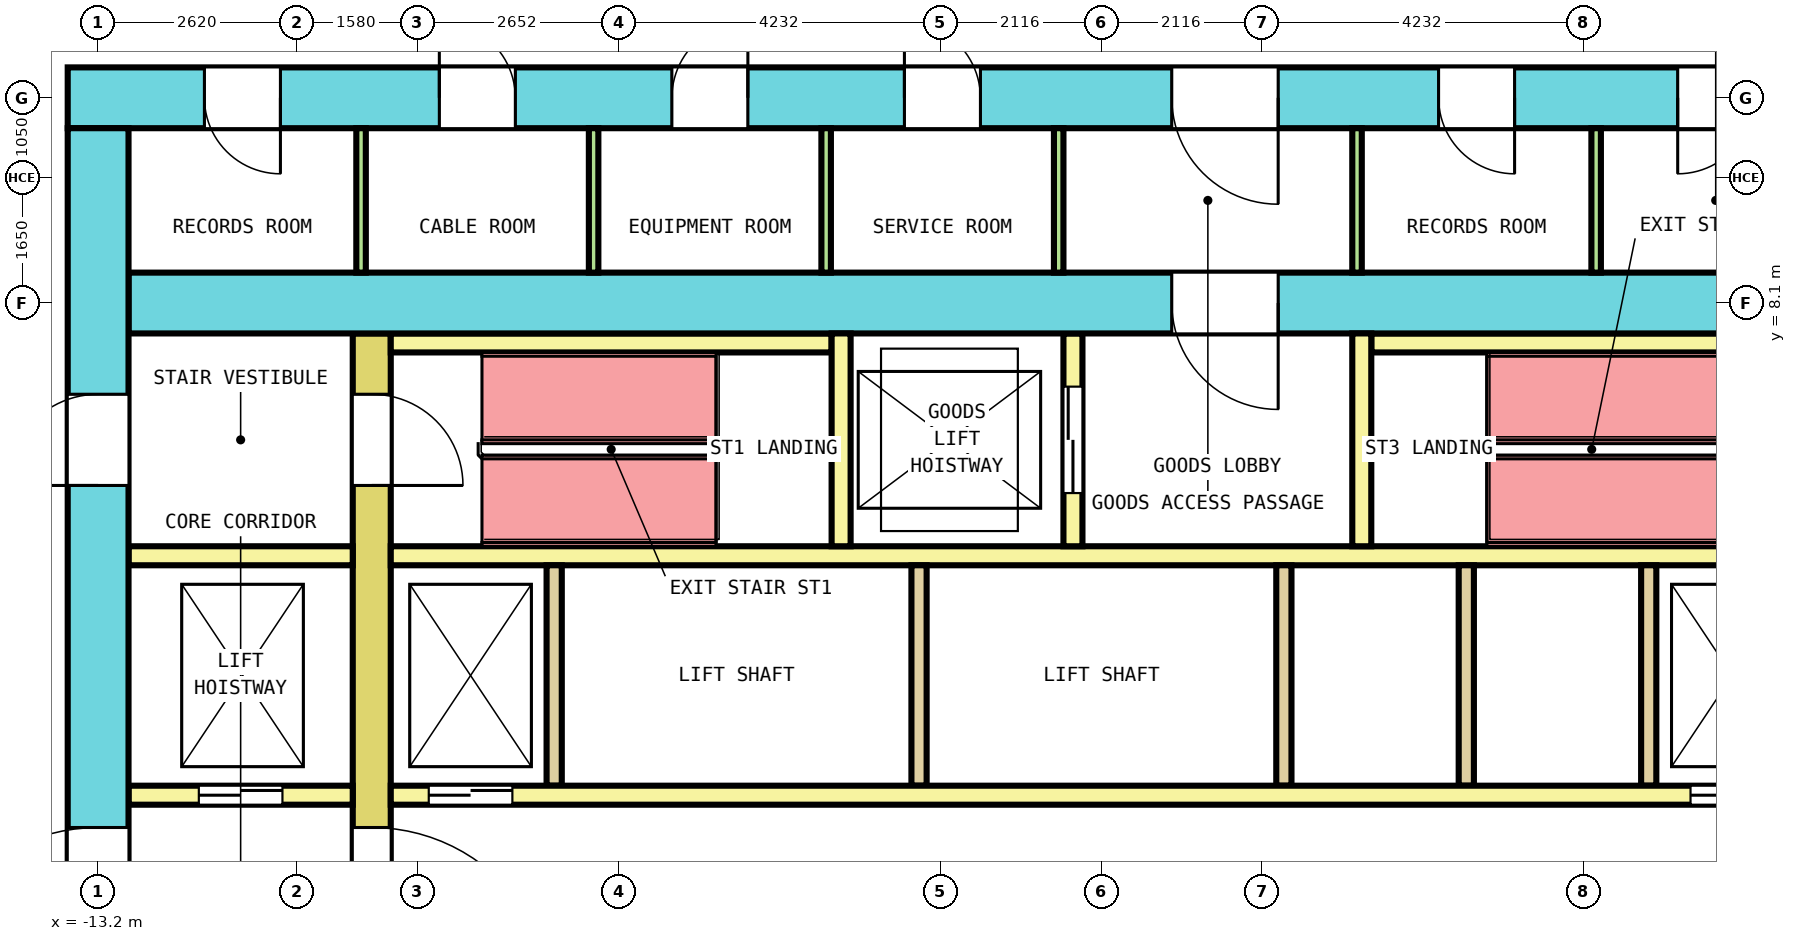
"""IFC4 building model, lengths in metres.
Left out: names, types, materials, properties, quantities, classifications, styles, units other than length and angle.
Written with IfcOpenShell. Run it as: python <this file> out.ifc"""

import sys

from ifc_helpers import new_model, si_unit, direction, frame, frame_2d, origin, place, context, subcontext, project, spatial, rectangle, extrude, element, fill, save


model = new_model("IFC4")
c1 = context("Model", 3, precision=1e-05, world=origin(), true_north=direction((0.0, 1.0)))
c2 = subcontext(c1, "Body", "Model", "MODEL_VIEW")
j1 = project(units=[si_unit("LENGTHUNIT", "METRE"), si_unit("PLANEANGLEUNIT", "RADIAN")], contexts=[c1])
p1 = place(None, origin())
s1 = spatial("IfcSite", under=j1, at=p1, CompositionType="ELEMENT")
p2 = place(p1, origin())
s2 = spatial("IfcBuilding", under=s1, at=p2, CompositionType="ELEMENT")
p3 = place(p2, frame((0.0, 0.0, 102.8)))
s3 = spatial("IfcBuildingStorey", under=s2, at=p3, CompositionType="ELEMENT", Elevation=102.8)
p4 = place(p3, frame((-13.6, 10.8, 0.0), z_axis=(0.0, 0.0, 1.0), x_axis=(1.0, 0.0, 0.0)))
e1 = element("IfcWall", 1, at=p4, inside=s3, PredefinedType="SHEAR", context=c2, shape_type="SweptSolid", body=[
    extrude(rectangle(XDim=27.2, YDim=0.8, at=frame_2d((13.6, 0.0))), origin(), (0.0, 0.0, 1.0), 4.1),
])
p5 = place(p4, frame((1.798, 0.0, 0.0)))
e2 = element("IfcOpeningElement", 2, at=p5, cuts=e1, PredefinedType="OPENING", context=c2, shape_type="SweptSolid", body=[
    extrude(rectangle(XDim=1.0, YDim=2.1, at=frame_2d((0.5, 1.05))), frame((0.0, 0.41, 0.0), z_axis=(0.0, -1.0, 0.0), x_axis=(1.0, 0.0, 0.0)), (0.0, 0.0, 1.0), 0.82),
])
p6 = place(p4, frame((4.889, 0.0, 0.0)))
e3 = element("IfcOpeningElement", 3, at=p6, cuts=e1, PredefinedType="OPENING", context=c2, shape_type="SweptSolid", body=[
    extrude(rectangle(XDim=1.0, YDim=2.1, at=frame_2d((0.5, 1.05))), frame((0.0, 0.41, 0.0), z_axis=(0.0, -1.0, 0.0), x_axis=(1.0, 0.0, 0.0)), (0.0, 0.0, 1.0), 0.82),
])
p7 = place(p4, frame((7.948, 0.0, 0.0)))
e4 = element("IfcOpeningElement", 4, at=p7, cuts=e1, PredefinedType="OPENING", context=c2, shape_type="SweptSolid", body=[
    extrude(rectangle(XDim=1.0, YDim=2.1, at=frame_2d((0.5, 1.05))), frame((0.0, 0.41, 0.0), z_axis=(0.0, -1.0, 0.0), x_axis=(1.0, 0.0, 0.0)), (0.0, 0.0, 1.0), 0.82),
])
p8 = place(p4, frame((11.008, 0.0, 0.0)))
e5 = element("IfcOpeningElement", 5, at=p8, cuts=e1, PredefinedType="OPENING", context=c2, shape_type="SweptSolid", body=[
    extrude(rectangle(XDim=1.0, YDim=2.1, at=frame_2d((0.5, 1.05))), frame((0.0, 0.41, 0.0), z_axis=(0.0, -1.0, 0.0), x_axis=(1.0, 0.0, 0.0)), (0.0, 0.0, 1.0), 0.82),
])
p9 = place(p4, frame((18.035, 0.0, 0.0)))
e6 = element("IfcOpeningElement", 6, at=p9, cuts=e1, PredefinedType="OPENING", context=c2, shape_type="SweptSolid", body=[
    extrude(rectangle(XDim=1.0, YDim=2.1, at=frame_2d((0.5, 1.05))), frame((0.0, 0.41, 0.0), z_axis=(0.0, -1.0, 0.0), x_axis=(1.0, 0.0, 0.0)), (0.0, 0.0, 1.0), 0.82),
])
p10 = place(p4, frame((21.181, 0.0, 0.0)))
e7 = element("IfcOpeningElement", 7, at=p10, cuts=e1, PredefinedType="OPENING", context=c2, shape_type="SweptSolid", body=[
    extrude(rectangle(XDim=1.0, YDim=2.1, at=frame_2d((0.5, 1.05))), frame((0.0, 0.41, 0.0), z_axis=(0.0, -1.0, 0.0), x_axis=(1.0, 0.0, 0.0)), (0.0, 0.0, 1.0), 0.82),
])
p11 = place(p4, frame((24.358, 0.0, 0.0)))
e8 = element("IfcOpeningElement", 8, at=p11, cuts=e1, PredefinedType="OPENING", context=c2, shape_type="SweptSolid", body=[
    extrude(rectangle(XDim=1.0, YDim=2.1, at=frame_2d((0.5, 1.05))), frame((0.0, 0.41, 0.0), z_axis=(0.0, -1.0, 0.0), x_axis=(1.0, 0.0, 0.0)), (0.0, 0.0, 1.0), 0.82),
])
p12 = place(p4, frame((14.525, 0.0, 0.0)))
e9 = element("IfcOpeningElement", 9, at=p12, cuts=e1, PredefinedType="OPENING", context=c2, shape_type="SweptSolid", body=[
    extrude(rectangle(XDim=1.4, YDim=2.1, at=frame_2d((0.7, 1.05))), frame((0.0, 0.41, 0.0), z_axis=(0.0, -1.0, 0.0), x_axis=(1.0, 0.0, 0.0)), (0.0, 0.0, 1.0), 0.82),
])
p13 = place(p3, frame((-13.2, -10.4, 0.0), z_axis=(0.0, 0.0, 1.0), x_axis=(0.0, 1.0, 0.0)))
e10 = element("IfcWall", 10, at=p13, inside=s3, PredefinedType="SHEAR", context=c2, shape_type="SweptSolid", body=[
    extrude(rectangle(XDim=20.8, YDim=0.8, at=frame_2d((10.4, 0.0))), origin(), (0.0, 0.0, 1.0), 4.1),
])
p14 = place(p13, frame((9.2, 0.0, 0.0)))
e11 = element("IfcOpeningElement", 11, at=p14, cuts=e10, PredefinedType="OPENING", context=c2, shape_type="SweptSolid", body=[
    extrude(rectangle(XDim=2.4, YDim=2.1, at=frame_2d((1.2, 1.05))), frame((0.0, 0.41, 0.0), z_axis=(0.0, -1.0, 0.0), x_axis=(1.0, 0.0, 0.0)), (0.0, 0.0, 1.0), 0.82),
])
p15 = place(p13, frame((16.1, 0.0, 0.0)))
e12 = element("IfcOpeningElement", 12, at=p15, cuts=e10, PredefinedType="OPENING", context=c2, shape_type="SweptSolid", body=[
    extrude(rectangle(XDim=1.2, YDim=2.1, at=frame_2d((0.6, 1.05))), frame((0.0, 0.41, 0.0), z_axis=(0.0, -1.0, 0.0), x_axis=(1.0, 0.0, 0.0)), (0.0, 0.0, 1.0), 0.82),
])
p16 = place(p13, frame((3.5, 0.0, 0.0)))
e13 = element("IfcOpeningElement", 13, at=p16, cuts=e10, PredefinedType="OPENING", context=c2, shape_type="SweptSolid", body=[
    extrude(rectangle(XDim=1.2, YDim=2.1, at=frame_2d((0.6, 1.05))), frame((0.0, 0.41, 0.0), z_axis=(0.0, -1.0, 0.0), x_axis=(1.0, 0.0, 0.0)), (0.0, 0.0, 1.0), 0.82),
])
p17 = place(p3, frame((-12.8, 8.1, 0.0), z_axis=(0.0, 0.0, 1.0), x_axis=(1.0, 0.0, 0.0)))
e14 = element("IfcWall", 14, at=p17, inside=s3, PredefinedType="SHEAR", context=c2, shape_type="SweptSolid", body=[
    extrude(rectangle(XDim=25.6, YDim=0.8, at=frame_2d((12.8, 0.0))), origin(), (0.0, 0.0, 1.0), 4.1),
])
p18 = place(p17, frame((13.725, 0.0, 0.0)))
e15 = element("IfcOpeningElement", 15, at=p18, cuts=e14, PredefinedType="OPENING", context=c2, shape_type="SweptSolid", body=[
    extrude(rectangle(XDim=1.4, YDim=2.1, at=frame_2d((0.7, 1.05))), frame((0.0, 0.41, 0.0), z_axis=(0.0, -1.0, 0.0), x_axis=(1.0, 0.0, 0.0)), (0.0, 0.0, 1.0), 0.82),
])
p19 = place(p3, frame((-9.6, -7.7, 0.0), z_axis=(0.0, 0.0, 1.0), x_axis=(0.0, 1.0, 0.0)))
e16 = element("IfcWall", 16, at=p19, inside=s3, PredefinedType="SHEAR", context=c2, shape_type="SweptSolid", body=[
    extrude(rectangle(XDim=15.4, YDim=0.5, at=frame_2d((7.7, 0.0))), origin(), (0.0, 0.0, 1.0), 4.1),
])
p20 = place(p19, frame((6.5, 0.0, 0.0)))
e17 = element("IfcOpeningElement", 17, at=p20, cuts=e16, PredefinedType="OPENING", context=c2, shape_type="SweptSolid", body=[
    extrude(rectangle(XDim=2.4, YDim=2.1, at=frame_2d((1.2, 1.05))), frame((0.0, 0.26, 0.0), z_axis=(0.0, -1.0, 0.0), x_axis=(1.0, 0.0, 0.0)), (0.0, 0.0, 1.0), 0.52),
])
p21 = place(p19, frame((13.4, 0.0, 0.0)))
e18 = element("IfcOpeningElement", 18, at=p21, cuts=e16, PredefinedType="OPENING", context=c2, shape_type="SweptSolid", body=[
    extrude(rectangle(XDim=1.2, YDim=2.1, at=frame_2d((0.6, 1.05))), frame((0.0, 0.26, 0.0), z_axis=(0.0, -1.0, 0.0), x_axis=(1.0, 0.0, 0.0)), (0.0, 0.0, 1.0), 0.52),
])
p22 = place(p19, frame((0.8, 0.0, 0.0)))
e19 = element("IfcOpeningElement", 19, at=p22, cuts=e16, PredefinedType="OPENING", context=c2, shape_type="SweptSolid", body=[
    extrude(rectangle(XDim=1.2, YDim=2.1, at=frame_2d((0.6, 1.05))), frame((0.0, 0.26, 0.0), z_axis=(0.0, -1.0, 0.0), x_axis=(1.0, 0.0, 0.0)), (0.0, 0.0, 1.0), 0.52),
])
p23 = place(p3, frame((-12.8, 1.625, 0.0), z_axis=(0.0, 0.0, 1.0), x_axis=(1.0, 0.0, 0.0)))
e20 = element("IfcWall", 20, at=p23, inside=s3, PredefinedType="SOLIDWALL", context=c2, shape_type="SweptSolid", body=[
    extrude(rectangle(XDim=2.95, YDim=0.25, at=frame_2d((1.475, 0.0))), origin(), (0.0, 0.0, 1.0), 4.1),
])
p24 = place(p23, frame((0.925, 0.0, 0.0)))
e21 = element("IfcOpeningElement", 21, at=p24, cuts=e20, PredefinedType="OPENING", context=c2, shape_type="SweptSolid", body=[
    extrude(rectangle(XDim=1.1, YDim=2.1, at=frame_2d((0.55, 1.05))), frame((0.0, 0.135, 0.0), z_axis=(0.0, -1.0, 0.0), x_axis=(1.0, 0.0, 0.0)), (0.0, 0.0, 1.0), 0.27),
])
p25 = place(p3, frame((-9.35, 1.625, 0.0), z_axis=(0.0, 0.0, 1.0), x_axis=(1.0, 0.0, 0.0)))
e22 = element("IfcWall", 22, at=p25, inside=s3, PredefinedType="SOLIDWALL", context=c2, shape_type="SweptSolid", body=[
    extrude(rectangle(XDim=18.7, YDim=0.25, at=frame_2d((9.35, 0.0))), origin(), (0.0, 0.0, 1.0), 4.1),
])
p26 = place(p25, frame((0.5, 0.0, 0.0)))
e23 = element("IfcOpeningElement", 23, at=p26, cuts=e22, PredefinedType="OPENING", context=c2, shape_type="SweptSolid", body=[
    extrude(rectangle(XDim=1.1, YDim=2.1, at=frame_2d((0.55, 1.05))), frame((0.0, 0.135, 0.0), z_axis=(0.0, -1.0, 0.0), x_axis=(1.0, 0.0, 0.0)), (0.0, 0.0, 1.0), 0.27),
])
p27 = place(p25, frame((17.1, 0.0, 0.0)))
e24 = element("IfcOpeningElement", 24, at=p27, cuts=e22, PredefinedType="OPENING", context=c2, shape_type="SweptSolid", body=[
    extrude(rectangle(XDim=1.1, YDim=2.1, at=frame_2d((0.55, 1.05))), frame((0.0, 0.135, 0.0), z_axis=(0.0, -1.0, 0.0), x_axis=(1.0, 0.0, 0.0)), (0.0, 0.0, 1.0), 0.27),
])
p28 = place(p3, frame((-12.8, 4.775, 0.0), z_axis=(0.0, 0.0, 1.0), x_axis=(1.0, 0.0, 0.0)))
e25 = element("IfcWall", 25, at=p28, inside=s3, PredefinedType="SOLIDWALL", context=c2, shape_type="SweptSolid", body=[
    extrude(rectangle(XDim=2.95, YDim=0.25, at=frame_2d((1.475, 0.0))), origin(), (0.0, 0.0, 1.0), 4.1),
])
p29 = place(p3, frame((-9.35, 4.775, 0.0), z_axis=(0.0, 0.0, 1.0), x_axis=(1.0, 0.0, 0.0)))
e26 = element("IfcWall", 26, at=p29, inside=s3, PredefinedType="SOLIDWALL", context=c2, shape_type="SweptSolid", body=[
    extrude(rectangle(XDim=18.7, YDim=0.25, at=frame_2d((9.35, 0.0))), origin(), (0.0, 0.0, 1.0), 4.1),
])
for number, where, z_axis, x_axis in (
    (27, (-7.2, 1.75, 0.0), (0.0, 0.0, 1.0), (0.0, 1.0, 0.0)),
    (28, (-2.4, 1.75, 0.0), (0.0, 0.0, 1.0), (0.0, 1.0, 0.0)),
    (29, (2.4, 1.75, 0.0), (0.0, 0.0, 1.0), (0.0, 1.0, 0.0)),
    (30, (4.8, 1.75, 0.0), (0.0, 0.0, 1.0), (0.0, 1.0, 0.0)),
    (31, (7.2, 1.75, 0.0), (0.0, 0.0, 1.0), (0.0, 1.0, 0.0)),
):
    element("IfcWall", number, at=place(p3, frame(where, z_axis=z_axis, x_axis=x_axis)), inside=s3, PredefinedType="SOLIDWALL", context=c2, shape_type="SweptSolid", body=[
        extrude(rectangle(XDim=2.9, YDim=0.2, at=frame_2d((1.45, 0.0))), origin(), (0.0, 0.0, 1.0), 4.1),
    ])
for number, where, z_axis, x_axis in (
    (32, (-9.35, 7.575, 0.0), (0.0, 0.0, 1.0), (1.0, 0.0, 0.0)),
    (33, (3.55, 7.575, 0.0), (0.0, 0.0, 1.0), (1.0, 0.0, 0.0)),
):
    element("IfcWall", number, at=place(p3, frame(where, z_axis=z_axis, x_axis=x_axis)), inside=s3, PredefinedType="SOLIDWALL", context=c2, shape_type="SweptSolid", body=[
        extrude(rectangle(XDim=5.8, YDim=0.25, at=frame_2d((2.9, 0.0))), origin(), (0.0, 0.0, 1.0), 4.1),
    ])
p30 = place(p3, frame((-3.425, 4.9, 0.0), z_axis=(0.0, 0.0, 1.0), x_axis=(0.0, 1.0, 0.0)))
e34 = element("IfcWall", 34, at=p30, inside=s3, PredefinedType="SOLIDWALL", context=c2, shape_type="SweptSolid", body=[
    extrude(rectangle(XDim=2.8, YDim=0.25, at=frame_2d((1.4, 0.0))), origin(), (0.0, 0.0, 1.0), 4.1),
])
p31 = place(p3, frame((-0.375, 4.9, 0.0), z_axis=(0.0, 0.0, 1.0), x_axis=(0.0, 1.0, 0.0)))
e35 = element("IfcWall", 35, at=p31, inside=s3, PredefinedType="SOLIDWALL", context=c2, shape_type="SweptSolid", body=[
    extrude(rectangle(XDim=2.8, YDim=0.25, at=frame_2d((1.4, 0.0))), origin(), (0.0, 0.0, 1.0), 4.1),
])
p32 = place(p31, frame((0.7, 0.0, 0.0)))
e36 = element("IfcOpeningElement", 36, at=p32, cuts=e35, PredefinedType="OPENING", context=c2, shape_type="SweptSolid", body=[
    extrude(rectangle(XDim=1.4, YDim=2.1, at=frame_2d((0.7, 1.05))), frame((0.0, 0.135, 0.0), z_axis=(0.0, -1.0, 0.0), x_axis=(1.0, 0.0, 0.0)), (0.0, 0.0, 1.0), 0.27),
])
p33 = place(p3, frame((3.425, 4.9, 0.0), z_axis=(0.0, 0.0, 1.0), x_axis=(0.0, 1.0, 0.0)))
e37 = element("IfcWall", 37, at=p33, inside=s3, PredefinedType="SOLIDWALL", context=c2, shape_type="SweptSolid", body=[
    extrude(rectangle(XDim=2.8, YDim=0.25, at=frame_2d((1.4, 0.0))), origin(), (0.0, 0.0, 1.0), 4.1),
])
for number, where, z_axis, x_axis in (
    (38, (-9.74, 8.5, 0.0), (0.0, 0.0, 1.0), (0.0, 1.0, 0.0)),
    (39, (-6.681, 8.5, 0.0), (0.0, 0.0, 1.0), (0.0, 1.0, 0.0)),
    (40, (-3.622, 8.5, 0.0), (0.0, 0.0, 1.0), (0.0, 1.0, 0.0)),
    (41, (-0.562, 8.5, 0.0), (0.0, 0.0, 1.0), (0.0, 1.0, 0.0)),
    (42, (3.363, 8.5, 0.0), (0.0, 0.0, 1.0), (0.0, 1.0, 0.0)),
    (43, (6.508, 8.5, 0.0), (0.0, 0.0, 1.0), (0.0, 1.0, 0.0)),
):
    element("IfcWall", number, at=place(p3, frame(where, z_axis=z_axis, x_axis=x_axis)), inside=s3, PredefinedType="PARTITIONING", context=c2, shape_type="SweptSolid", body=[
        extrude(rectangle(XDim=1.9, YDim=0.125, at=frame_2d((0.95, 0.0))), origin(), (0.0, 0.0, 1.0), 4.1),
    ])
p34 = place(p24, origin())
e44 = element("IfcDoor", 44, at=p34, inside=s3, OperationType="DOUBLE_DOOR_SLIDING", PredefinedType="DOOR", context=c2, shape_type="SweptSolid", body=[
    extrude(rectangle(XDim=1.1, YDim=2.1, at=frame_2d((0.55, 1.05))), frame((0.0, 0.075, 0.0), z_axis=(0.0, -1.0, 0.0), x_axis=(1.0, 0.0, 0.0)), (0.0, 0.0, 1.0), 0.15),
])
fill(e21, e44)
p35 = place(p26, origin())
e45 = element("IfcDoor", 45, at=p35, inside=s3, OperationType="DOUBLE_DOOR_SLIDING", PredefinedType="DOOR", context=c2, shape_type="SweptSolid", body=[
    extrude(rectangle(XDim=1.1, YDim=2.1, at=frame_2d((0.55, 1.05))), frame((0.0, 0.075, 0.0), z_axis=(0.0, -1.0, 0.0), x_axis=(1.0, 0.0, 0.0)), (0.0, 0.0, 1.0), 0.15),
])
fill(e23, e45)
p36 = place(p27, origin())
e46 = element("IfcDoor", 46, at=p36, inside=s3, OperationType="DOUBLE_DOOR_SLIDING", PredefinedType="DOOR", context=c2, shape_type="SweptSolid", body=[
    extrude(rectangle(XDim=1.1, YDim=2.1, at=frame_2d((0.55, 1.05))), frame((0.0, 0.075, 0.0), z_axis=(0.0, -1.0, 0.0), x_axis=(1.0, 0.0, 0.0)), (0.0, 0.0, 1.0), 0.15),
])
fill(e24, e46)
p37 = place(p32, origin())
e47 = element("IfcDoor", 47, at=p37, inside=s3, OperationType="DOUBLE_DOOR_SLIDING", PredefinedType="DOOR", context=c2, shape_type="SweptSolid", body=[
    extrude(rectangle(XDim=1.4, YDim=2.1, at=frame_2d((0.7, 1.05))), frame((0.0, 0.075, 0.0), z_axis=(0.0, -1.0, 0.0), x_axis=(1.0, 0.0, 0.0)), (0.0, 0.0, 1.0), 0.15),
])
fill(e36, e47)
p38 = place(p20, origin())
e48 = element("IfcDoor", 48, at=p38, inside=s3, OperationType="DOUBLE_DOOR_SINGLE_SWING", PredefinedType="DOOR", context=c2, shape_type="SweptSolid", body=[
    extrude(rectangle(XDim=2.4, YDim=2.1, at=frame_2d((1.2, 1.05))), frame((0.0, 0.2, 0.0), z_axis=(0.0, -1.0, 0.0), x_axis=(1.0, 0.0, 0.0)), (0.0, 0.0, 1.0), 0.4),
])
fill(e17, e48)
p39 = place(p14, origin())
e49 = element("IfcDoor", 49, at=p39, inside=s3, OperationType="DOUBLE_DOOR_SINGLE_SWING", PredefinedType="DOOR", context=c2, shape_type="SweptSolid", body=[
    extrude(rectangle(XDim=2.4, YDim=2.1, at=frame_2d((1.2, 1.05))), frame((0.0, 0.3, 0.0), z_axis=(0.0, -1.0, 0.0), x_axis=(1.0, 0.0, 0.0)), (0.0, 0.0, 1.0), 0.6),
])
fill(e11, e49)
p40 = place(p21, origin())
e50 = element("IfcDoor", 50, at=p40, inside=s3, OperationType="SINGLE_SWING_LEFT", PredefinedType="DOOR", context=c2, shape_type="SweptSolid", body=[
    extrude(rectangle(XDim=1.2, YDim=2.1, at=frame_2d((0.6, 1.05))), frame((0.0, 0.2, 0.0), z_axis=(0.0, -1.0, 0.0), x_axis=(1.0, 0.0, 0.0)), (0.0, 0.0, 1.0), 0.4),
])
fill(e18, e50)
p41 = place(p15, origin())
e51 = element("IfcDoor", 51, at=p41, inside=s3, OperationType="SINGLE_SWING_RIGHT", PredefinedType="DOOR", context=c2, shape_type="SweptSolid", body=[
    extrude(rectangle(XDim=1.2, YDim=2.1, at=frame_2d((0.6, 1.05))), frame((0.0, 0.3, 0.0), z_axis=(0.0, -1.0, 0.0), x_axis=(1.0, 0.0, 0.0)), (0.0, 0.0, 1.0), 0.6),
])
fill(e12, e51)
p42 = place(p18, origin())
e52 = element("IfcDoor", 52, at=p42, inside=s3, OperationType="DOUBLE_DOOR_SINGLE_SWING", PredefinedType="DOOR", context=c2, shape_type="SweptSolid", body=[
    extrude(rectangle(XDim=1.4, YDim=2.1, at=frame_2d((0.7, 1.05))), frame((0.0, 0.3, 0.0), z_axis=(0.0, -1.0, 0.0), x_axis=(1.0, 0.0, 0.0)), (0.0, 0.0, 1.0), 0.6),
])
fill(e15, e52)
p43 = place(p5, origin())
e53 = element("IfcDoor", 53, at=p43, inside=s3, OperationType="SINGLE_SWING_LEFT", PredefinedType="DOOR", context=c2, shape_type="SweptSolid", body=[
    extrude(rectangle(XDim=1.0, YDim=2.1, at=frame_2d((0.5, 1.05))), frame((0.0, 0.3, 0.0), z_axis=(0.0, -1.0, 0.0), x_axis=(1.0, 0.0, 0.0)), (0.0, 0.0, 1.0), 0.6),
])
fill(e2, e53)
p44 = place(p6, origin())
e54 = element("IfcDoor", 54, at=p44, inside=s3, OperationType="SINGLE_SWING_RIGHT", PredefinedType="DOOR", context=c2, shape_type="SweptSolid", body=[
    extrude(rectangle(XDim=1.0, YDim=2.1, at=frame_2d((0.5, 1.05))), frame((0.0, 0.3, 0.0), z_axis=(0.0, -1.0, 0.0), x_axis=(1.0, 0.0, 0.0)), (0.0, 0.0, 1.0), 0.6),
])
fill(e3, e54)
p45 = place(p7, origin())
e55 = element("IfcDoor", 55, at=p45, inside=s3, OperationType="SINGLE_SWING_LEFT", PredefinedType="DOOR", context=c2, shape_type="SweptSolid", body=[
    extrude(rectangle(XDim=1.0, YDim=2.1, at=frame_2d((0.5, 1.05))), frame((0.0, 0.3, 0.0), z_axis=(0.0, -1.0, 0.0), x_axis=(1.0, 0.0, 0.0)), (0.0, 0.0, 1.0), 0.6),
])
fill(e4, e55)
p46 = place(p8, origin())
e56 = element("IfcDoor", 56, at=p46, inside=s3, OperationType="SINGLE_SWING_RIGHT", PredefinedType="DOOR", context=c2, shape_type="SweptSolid", body=[
    extrude(rectangle(XDim=1.0, YDim=2.1, at=frame_2d((0.5, 1.05))), frame((0.0, 0.3, 0.0), z_axis=(0.0, -1.0, 0.0), x_axis=(1.0, 0.0, 0.0)), (0.0, 0.0, 1.0), 0.6),
])
fill(e5, e56)
p47 = place(p9, origin())
e57 = element("IfcDoor", 57, at=p47, inside=s3, OperationType="SINGLE_SWING_LEFT", PredefinedType="DOOR", context=c2, shape_type="SweptSolid", body=[
    extrude(rectangle(XDim=1.0, YDim=2.1, at=frame_2d((0.5, 1.05))), frame((0.0, 0.3, 0.0), z_axis=(0.0, -1.0, 0.0), x_axis=(1.0, 0.0, 0.0)), (0.0, 0.0, 1.0), 0.6),
])
fill(e6, e57)
p48 = place(p10, origin())
e58 = element("IfcDoor", 58, at=p48, inside=s3, OperationType="SINGLE_SWING_RIGHT", PredefinedType="DOOR", context=c2, shape_type="SweptSolid", body=[
    extrude(rectangle(XDim=1.0, YDim=2.1, at=frame_2d((0.5, 1.05))), frame((0.0, 0.3, 0.0), z_axis=(0.0, -1.0, 0.0), x_axis=(1.0, 0.0, 0.0)), (0.0, 0.0, 1.0), 0.6),
])
fill(e7, e58)
p49 = place(p12, origin())
e59 = element("IfcDoor", 59, at=p49, inside=s3, OperationType="DOUBLE_DOOR_SINGLE_SWING", PredefinedType="DOOR", context=c2, shape_type="SweptSolid", body=[
    extrude(rectangle(XDim=1.4, YDim=2.1, at=frame_2d((0.7, 1.05))), frame((0.0, 0.3, 0.0), z_axis=(0.0, -1.0, 0.0), x_axis=(1.0, 0.0, 0.0)), (0.0, 0.0, 1.0), 0.6),
])
fill(e9, e59)
save(model, sys.argv[1])
